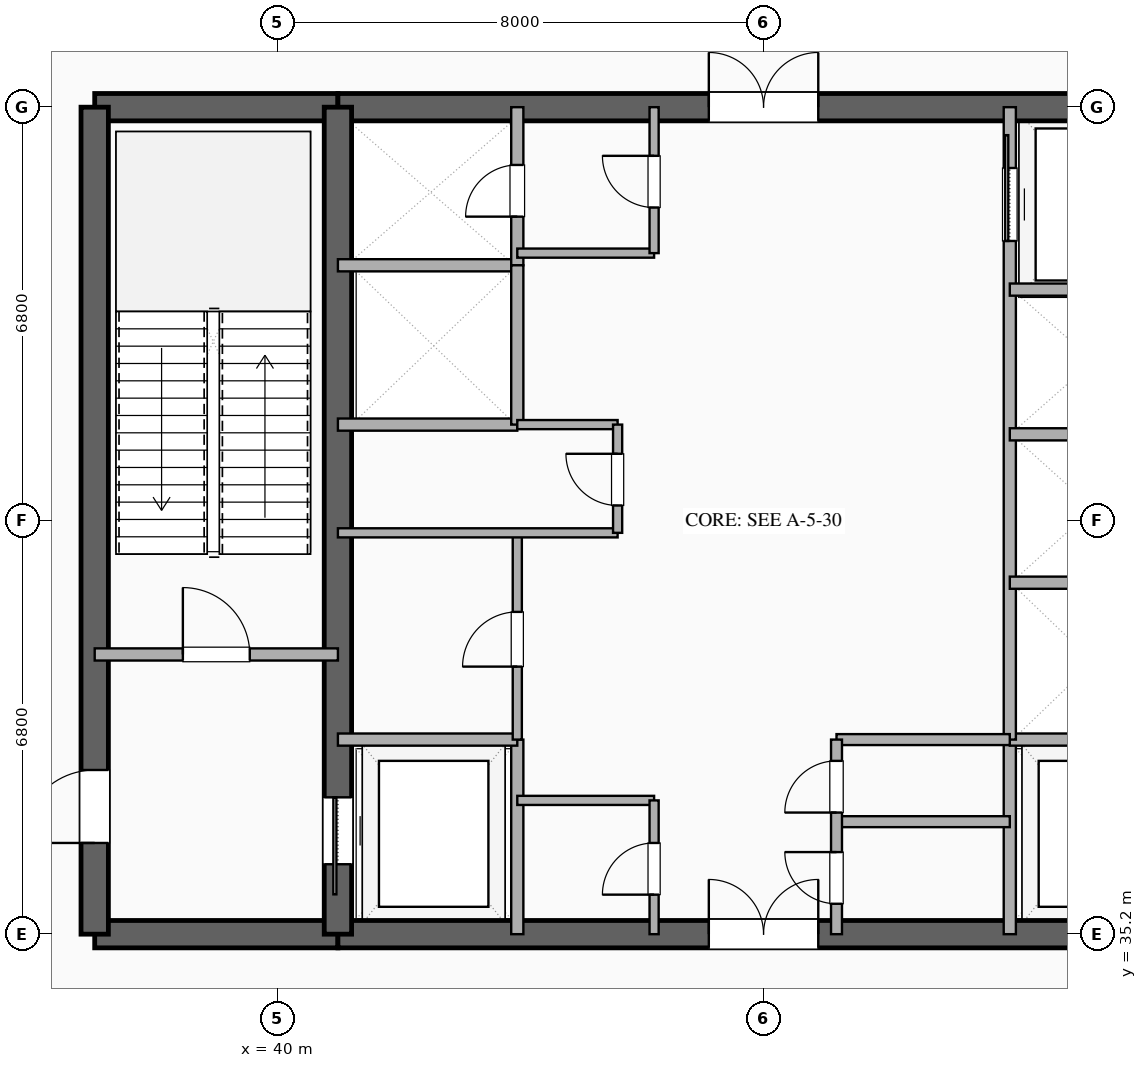
"""IFC4 building model, lengths in metres.
Left out: names, types, materials, properties, quantities, classifications, styles, units other than length and angle.
Written with IfcOpenShell. Run it as: python <this file> out.ifc"""

import sys

from ifc_helpers import new_model, si_unit, direction, frame, frame_2d, origin, place, context, subcontext, project, spatial, rectangle, extrude, element, fill, save


model = new_model("IFC4")
c1 = context("Model", 3, precision=1e-05, world=origin(), true_north=direction((0.0, 1.0)))
c2 = subcontext(c1, "Body", "Model", "MODEL_VIEW")
j1 = project(units=[si_unit("LENGTHUNIT", "METRE"), si_unit("PLANEANGLEUNIT", "RADIAN")], contexts=[c1])
p1 = place(None, origin())
s1 = spatial("IfcSite", under=j1, at=p1, CompositionType="ELEMENT")
p2 = place(p1, origin())
s2 = spatial("IfcBuilding", under=s1, at=p2, CompositionType="ELEMENT")
p3 = place(p2, frame((0.0, 0.0, 201.0)))
s3 = spatial("IfcBuildingStorey", under=s2, at=p3, CompositionType="ELEMENT", Elevation=201.0)
p4 = place(p3, frame((37.0, 35.2, 0.0), z_axis=(0.0, 0.0, 1.0), x_axis=(1.0, 0.0, 0.0)))
e1 = element("IfcWall", 1, at=p4, inside=s3, PredefinedType="SHEAR", context=c2, shape_type="SweptSolid", body=[
    extrude(rectangle(XDim=4.0, YDim=0.45, at=frame_2d((2.0, 0.0))), origin(), (0.0, 0.0, 1.0), 5.15),
])
p5 = place(p3, frame((41.0, 35.2, 0.0), z_axis=(0.0, 0.0, 1.0), x_axis=(1.0, 0.0, 0.0)))
e2 = element("IfcWall", 2, at=p5, inside=s3, PredefinedType="SHEAR", context=c2, shape_type="SweptSolid", body=[
    extrude(rectangle(XDim=14.0, YDim=0.45, at=frame_2d((7.0, 0.0))), origin(), (0.0, 0.0, 1.0), 5.15),
])
p6 = place(p5, frame((6.1, 0.0, 0.0)))
e3 = element("IfcOpeningElement", 3, at=p6, cuts=e2, PredefinedType="OPENING", context=c2, shape_type="SweptSolid", body=[
    extrude(rectangle(XDim=1.8, YDim=2.25, at=frame_2d((0.9, 1.125))), frame((0.0, 0.235, 0.0), z_axis=(0.0, -1.0, 0.0), x_axis=(1.0, 0.0, 0.0)), (0.0, 0.0, 1.0), 0.47),
])
p7 = place(p3, frame((37.0, 48.8, 0.0), z_axis=(0.0, 0.0, 1.0), x_axis=(1.0, 0.0, 0.0)))
e4 = element("IfcWall", 4, at=p7, inside=s3, PredefinedType="SHEAR", context=c2, shape_type="SweptSolid", body=[
    extrude(rectangle(XDim=4.0, YDim=0.45, at=frame_2d((2.0, 0.0))), origin(), (0.0, 0.0, 1.0), 5.15),
])
p8 = place(p3, frame((41.0, 48.8, 0.0), z_axis=(0.0, 0.0, 1.0), x_axis=(1.0, 0.0, 0.0)))
e5 = element("IfcWall", 5, at=p8, inside=s3, PredefinedType="SHEAR", context=c2, shape_type="SweptSolid", body=[
    extrude(rectangle(XDim=14.0, YDim=0.45, at=frame_2d((7.0, 0.0))), origin(), (0.0, 0.0, 1.0), 5.15),
])
p9 = place(p8, frame((6.1, 0.0, 0.0)))
e6 = element("IfcOpeningElement", 6, at=p9, cuts=e5, PredefinedType="OPENING", context=c2, shape_type="SweptSolid", body=[
    extrude(rectangle(XDim=1.8, YDim=2.25, at=frame_2d((0.9, 1.125))), frame((0.0, 0.235, 0.0), z_axis=(0.0, -1.0, 0.0), x_axis=(1.0, 0.0, 0.0)), (0.0, 0.0, 1.0), 0.47),
])
p10 = place(p3, frame((37.0, 35.2, 0.0), z_axis=(0.0, 0.0, 1.0), x_axis=(0.0, 1.0, 0.0)))
e7 = element("IfcWall", 7, at=p10, inside=s3, PredefinedType="SHEAR", context=c2, shape_type="SweptSolid", body=[
    extrude(rectangle(XDim=13.6, YDim=0.45, at=frame_2d((6.8, 0.0))), origin(), (0.0, 0.0, 1.0), 5.15),
])
p11 = place(p10, frame((1.5, 0.0, 0.0)))
e8 = element("IfcOpeningElement", 8, at=p11, cuts=e7, PredefinedType="OPENING", context=c2, shape_type="SweptSolid", body=[
    extrude(rectangle(XDim=1.2, YDim=2.15, at=frame_2d((0.6, 1.075))), frame((0.0, 0.235, 0.0), z_axis=(0.0, -1.0, 0.0), x_axis=(1.0, 0.0, 0.0)), (0.0, 0.0, 1.0), 0.47),
])
p12 = place(p3, frame((41.0, 35.2, 0.0), z_axis=(0.0, 0.0, 1.0), x_axis=(0.0, 1.0, 0.0)))
e9 = element("IfcWall", 9, at=p12, inside=s3, PredefinedType="SHEAR", context=c2, shape_type="SweptSolid", body=[
    extrude(rectangle(XDim=13.6, YDim=0.45, at=frame_2d((6.8, 0.0))), origin(), (0.0, 0.0, 1.0), 5.15),
])
p13 = place(p12, frame((1.15, 0.0, 0.0)))
e10 = element("IfcOpeningElement", 10, at=p13, cuts=e9, PredefinedType="OPENING", context=c2, shape_type="SweptSolid", body=[
    extrude(rectangle(XDim=1.1, YDim=2.2, at=frame_2d((0.55, 1.1))), frame((0.0, 0.235, 0.0), z_axis=(0.0, -1.0, 0.0), x_axis=(1.0, 0.0, 0.0)), (0.0, 0.0, 1.0), 0.47),
])
p14 = place(p3, frame((37.0, 39.8, 0.0), z_axis=(0.0, 0.0, 1.0), x_axis=(1.0, 0.0, 0.0)))
e11 = element("IfcWall", 11, at=p14, inside=s3, PredefinedType="SOLIDWALL", context=c2, shape_type="SweptSolid", body=[
    extrude(rectangle(XDim=4.0, YDim=0.2, at=frame_2d((2.0, 0.0))), origin(), (0.0, 0.0, 1.0), 3.45),
])
p15 = place(p14, frame((1.45, 0.0, 0.0)))
e12 = element("IfcOpeningElement", 12, at=p15, cuts=e11, PredefinedType="OPENING", context=c2, shape_type="SweptSolid", body=[
    extrude(rectangle(XDim=1.1, YDim=2.15, at=frame_2d((0.55, 1.075))), frame((0.0, 0.11, 0.0), z_axis=(0.0, -1.0, 0.0), x_axis=(1.0, 0.0, 0.0)), (0.0, 0.0, 1.0), 0.22),
])
p16 = place(p3, frame((43.95, 35.2, 0.0), z_axis=(0.0, 0.0, 1.0), x_axis=(0.0, 1.0, 0.0)))
e13 = element("IfcWall", 13, at=p16, inside=s3, PredefinedType="SOLIDWALL", context=c2, shape_type="SweptSolid", body=[
    extrude(rectangle(XDim=3.2, YDim=0.2, at=frame_2d((1.6, 0.0))), origin(), (0.0, 0.0, 1.0), 3.45),
])
p17 = place(p3, frame((41.0, 38.4, 0.0), z_axis=(0.0, 0.0, 1.0), x_axis=(1.0, 0.0, 0.0)))
e14 = element("IfcWall", 14, at=p17, inside=s3, PredefinedType="SOLIDWALL", context=c2, shape_type="SweptSolid", body=[
    extrude(rectangle(XDim=2.95, YDim=0.2, at=frame_2d((1.475, 0.0))), origin(), (0.0, 0.0, 1.0), 3.45),
])
p18 = place(p3, frame((52.05, 35.2, 0.0), z_axis=(0.0, 0.0, 1.0), x_axis=(0.0, 1.0, 0.0)))
e15 = element("IfcWall", 15, at=p18, inside=s3, PredefinedType="SOLIDWALL", context=c2, shape_type="SweptSolid", body=[
    extrude(rectangle(XDim=3.2, YDim=0.2, at=frame_2d((1.6, 0.0))), origin(), (0.0, 0.0, 1.0), 3.45),
])
for number, where, z_axis, x_axis in (
    (16, (52.05, 38.4, 0.0), (0.0, 0.0, 1.0), (1.0, 0.0, 0.0)),
    (17, (41.0, 46.2, 0.0), (0.0, 0.0, 1.0), (1.0, 0.0, 0.0)),
):
    element("IfcWall", number, at=place(p3, frame(where, z_axis=z_axis, x_axis=x_axis)), inside=s3, PredefinedType="SOLIDWALL", context=c2, shape_type="SweptSolid", body=[
        extrude(rectangle(XDim=2.95, YDim=0.2, at=frame_2d((1.475, 0.0))), origin(), (0.0, 0.0, 1.0), 3.45),
    ])
p19 = place(p3, frame((43.95, 46.2, 0.0), z_axis=(0.0, 0.0, 1.0), x_axis=(0.0, 1.0, 0.0)))
e18 = element("IfcWall", 18, at=p19, inside=s3, PredefinedType="SOLIDWALL", context=c2, shape_type="SweptSolid", body=[
    extrude(rectangle(XDim=2.6, YDim=0.2, at=frame_2d((1.3, 0.0))), origin(), (0.0, 0.0, 1.0), 3.45),
])
p20 = place(p19, frame((0.8, 0.0, 0.0)))
e19 = element("IfcOpeningElement", 19, at=p20, cuts=e18, PredefinedType="OPENING", context=c2, shape_type="SweptSolid", body=[
    extrude(rectangle(XDim=0.85, YDim=2.15, at=frame_2d((0.425, 1.075))), frame((0.0, 0.11, 0.0), z_axis=(0.0, -1.0, 0.0), x_axis=(1.0, 0.0, 0.0)), (0.0, 0.0, 1.0), 0.22),
])
p21 = place(p3, frame((41.0, 43.58, 0.0), z_axis=(0.0, 0.0, 1.0), x_axis=(1.0, 0.0, 0.0)))
e20 = element("IfcWall", 20, at=p21, inside=s3, PredefinedType="SOLIDWALL", context=c2, shape_type="SweptSolid", body=[
    extrude(rectangle(XDim=2.95, YDim=0.2, at=frame_2d((1.475, 0.0))), origin(), (0.0, 0.0, 1.0), 3.45),
])
p22 = place(p3, frame((43.95, 43.58, 0.0), z_axis=(0.0, 0.0, 1.0), x_axis=(0.0, 1.0, 0.0)))
e21 = element("IfcWall", 21, at=p22, inside=s3, PredefinedType="SOLIDWALL", context=c2, shape_type="SweptSolid", body=[
    extrude(rectangle(XDim=2.62, YDim=0.2, at=frame_2d((1.31, 0.0))), origin(), (0.0, 0.0, 1.0), 3.45),
])
p23 = place(p3, frame((43.95, 38.4, 0.0), z_axis=(0.0, 0.0, 1.0), x_axis=(0.0, 1.0, 0.0)))
e22 = element("IfcWall", 22, at=p23, inside=s3, PredefinedType="PARTITIONING", context=c2, shape_type="SweptSolid", body=[
    extrude(rectangle(XDim=3.4, YDim=0.15, at=frame_2d((1.7, 0.0))), origin(), (0.0, 0.0, 1.0), 3.45),
])
p24 = place(p23, frame((1.2, 0.0, 0.0)))
e23 = element("IfcOpeningElement", 23, at=p24, cuts=e22, PredefinedType="OPENING", context=c2, shape_type="SweptSolid", body=[
    extrude(rectangle(XDim=0.9, YDim=2.15, at=frame_2d((0.45, 1.075))), frame((0.0, 0.085, 0.0), z_axis=(0.0, -1.0, 0.0), x_axis=(1.0, 0.0, 0.0)), (0.0, 0.0, 1.0), 0.17),
])
p25 = place(p3, frame((41.0, 41.8, 0.0), z_axis=(0.0, 0.0, 1.0), x_axis=(1.0, 0.0, 0.0)))
e24 = element("IfcWall", 24, at=p25, inside=s3, PredefinedType="PARTITIONING", context=c2, shape_type="SweptSolid", body=[
    extrude(rectangle(XDim=4.6, YDim=0.15, at=frame_2d((2.3, 0.0))), origin(), (0.0, 0.0, 1.0), 3.45),
])
p26 = place(p3, frame((43.95, 43.58, 0.0), z_axis=(0.0, 0.0, 1.0), x_axis=(1.0, 0.0, 0.0)))
e25 = element("IfcWall", 25, at=p26, inside=s3, PredefinedType="PARTITIONING", context=c2, shape_type="SweptSolid", body=[
    extrude(rectangle(XDim=1.65, YDim=0.15, at=frame_2d((0.825, 0.0))), origin(), (0.0, 0.0, 1.0), 3.45),
])
p27 = place(p3, frame((45.6, 41.8, 0.0), z_axis=(0.0, 0.0, 1.0), x_axis=(0.0, 1.0, 0.0)))
e26 = element("IfcWall", 26, at=p27, inside=s3, PredefinedType="PARTITIONING", context=c2, shape_type="SweptSolid", body=[
    extrude(rectangle(XDim=1.78, YDim=0.15, at=frame_2d((0.89, 0.0))), origin(), (0.0, 0.0, 1.0), 3.45),
])
p28 = place(p27, frame((0.45, 0.0, 0.0)))
e27 = element("IfcOpeningElement", 27, at=p28, cuts=e26, PredefinedType="OPENING", context=c2, shape_type="SweptSolid", body=[
    extrude(rectangle(XDim=0.85, YDim=2.15, at=frame_2d((0.425, 1.075))), frame((0.0, 0.085, 0.0), z_axis=(0.0, -1.0, 0.0), x_axis=(1.0, 0.0, 0.0)), (0.0, 0.0, 1.0), 0.17),
])
p29 = place(p3, frame((52.05, 38.4, 0.0), z_axis=(0.0, 0.0, 1.0), x_axis=(0.0, 1.0, 0.0)))
e28 = element("IfcWall", 28, at=p29, inside=s3, PredefinedType="SOLIDWALL", context=c2, shape_type="SweptSolid", body=[
    extrude(rectangle(XDim=10.4, YDim=0.2, at=frame_2d((5.2, 0.0))), origin(), (0.0, 0.0, 1.0), 3.45),
])
p30 = place(p29, frame((8.2, 0.0, 0.0)))
e29 = element("IfcOpeningElement", 29, at=p30, cuts=e28, PredefinedType="OPENING", context=c2, shape_type="SweptSolid", body=[
    extrude(rectangle(XDim=1.2, YDim=2.2, at=frame_2d((0.6, 1.1))), frame((0.0, 0.11, 0.0), z_axis=(0.0, -1.0, 0.0), x_axis=(1.0, 0.0, 0.0)), (0.0, 0.0, 1.0), 0.22),
])
for number, where, z_axis, x_axis in (
    (30, (52.05, 40.98, 0.0), (0.0, 0.0, 1.0), (1.0, 0.0, 0.0)),
    (31, (52.05, 43.42, 0.0), (0.0, 0.0, 1.0), (1.0, 0.0, 0.0)),
    (32, (52.05, 45.8, 0.0), (0.0, 0.0, 1.0), (1.0, 0.0, 0.0)),
):
    element("IfcWall", number, at=place(p3, frame(where, z_axis=z_axis, x_axis=x_axis)), inside=s3, PredefinedType="SOLIDWALL", context=c2, shape_type="SweptSolid", body=[
        extrude(rectangle(XDim=2.95, YDim=0.2, at=frame_2d((1.475, 0.0))), origin(), (0.0, 0.0, 1.0), 3.45),
    ])
p31 = place(p3, frame((43.95, 37.4, 0.0), z_axis=(0.0, 0.0, 1.0), x_axis=(1.0, 0.0, 0.0)))
e33 = element("IfcWall", 33, at=p31, inside=s3, PredefinedType="PARTITIONING", context=c2, shape_type="SweptSolid", body=[
    extrude(rectangle(XDim=2.25, YDim=0.15, at=frame_2d((1.125, 0.0))), origin(), (0.0, 0.0, 1.0), 3.45),
])
p32 = place(p3, frame((46.2, 35.2, 0.0), z_axis=(0.0, 0.0, 1.0), x_axis=(0.0, 1.0, 0.0)))
e34 = element("IfcWall", 34, at=p32, inside=s3, PredefinedType="PARTITIONING", context=c2, shape_type="SweptSolid", body=[
    extrude(rectangle(XDim=2.2, YDim=0.15, at=frame_2d((1.1, 0.0))), origin(), (0.0, 0.0, 1.0), 3.45),
])
p33 = place(p32, frame((0.65, 0.0, 0.0)))
e35 = element("IfcOpeningElement", 35, at=p33, cuts=e34, PredefinedType="OPENING", context=c2, shape_type="SweptSolid", body=[
    extrude(rectangle(XDim=0.85, YDim=2.15, at=frame_2d((0.425, 1.075))), frame((0.0, 0.085, 0.0), z_axis=(0.0, -1.0, 0.0), x_axis=(1.0, 0.0, 0.0)), (0.0, 0.0, 1.0), 0.17),
])
p34 = place(p3, frame((43.95, 46.4, 0.0), z_axis=(0.0, 0.0, 1.0), x_axis=(1.0, 0.0, 0.0)))
e36 = element("IfcWall", 36, at=p34, inside=s3, PredefinedType="PARTITIONING", context=c2, shape_type="SweptSolid", body=[
    extrude(rectangle(XDim=2.25, YDim=0.15, at=frame_2d((1.125, 0.0))), origin(), (0.0, 0.0, 1.0), 3.45),
])
p35 = place(p3, frame((46.2, 46.4, 0.0), z_axis=(0.0, 0.0, 1.0), x_axis=(0.0, 1.0, 0.0)))
e37 = element("IfcWall", 37, at=p35, inside=s3, PredefinedType="PARTITIONING", context=c2, shape_type="SweptSolid", body=[
    extrude(rectangle(XDim=2.4, YDim=0.15, at=frame_2d((1.2, 0.0))), origin(), (0.0, 0.0, 1.0), 3.45),
])
p36 = place(p35, frame((0.75, 0.0, 0.0)))
e38 = element("IfcOpeningElement", 38, at=p36, cuts=e37, PredefinedType="OPENING", context=c2, shape_type="SweptSolid", body=[
    extrude(rectangle(XDim=0.85, YDim=2.15, at=frame_2d((0.425, 1.075))), frame((0.0, 0.085, 0.0), z_axis=(0.0, -1.0, 0.0), x_axis=(1.0, 0.0, 0.0)), (0.0, 0.0, 1.0), 0.17),
])
for number, where, z_axis, x_axis in (
    (39, (49.2, 37.05, 0.0), (0.0, 0.0, 1.0), (1.0, 0.0, 0.0)),
    (40, (49.2, 38.4, 0.0), (0.0, 0.0, 1.0), (1.0, 0.0, 0.0)),
):
    element("IfcWall", number, at=place(p3, frame(where, z_axis=z_axis, x_axis=x_axis)), inside=s3, PredefinedType="PLUMBINGWALL", context=c2, shape_type="SweptSolid", body=[
        extrude(rectangle(XDim=2.85, YDim=0.18, at=frame_2d((1.425, 0.0))), origin(), (0.0, 0.0, 1.0), 3.45),
    ])
p37 = place(p3, frame((49.2, 35.2, 0.0), z_axis=(0.0, 0.0, 1.0), x_axis=(0.0, 1.0, 0.0)))
e41 = element("IfcWall", 41, at=p37, inside=s3, PredefinedType="PLUMBINGWALL", context=c2, shape_type="SweptSolid", body=[
    extrude(rectangle(XDim=3.2, YDim=0.18, at=frame_2d((1.6, 0.0))), origin(), (0.0, 0.0, 1.0), 3.45),
])
p38 = place(p37, frame((0.5, 0.0, 0.0)))
e42 = element("IfcOpeningElement", 42, at=p38, cuts=e41, PredefinedType="OPENING", context=c2, shape_type="SweptSolid", body=[
    extrude(rectangle(XDim=0.85, YDim=2.1, at=frame_2d((0.425, 1.05))), frame((0.0, 0.1, 0.0), z_axis=(0.0, -1.0, 0.0), x_axis=(1.0, 0.0, 0.0)), (0.0, 0.0, 1.0), 0.2),
])
p39 = place(p37, frame((2.0, 0.0, 0.0)))
e43 = element("IfcOpeningElement", 43, at=p39, cuts=e41, PredefinedType="OPENING", context=c2, shape_type="SweptSolid", body=[
    extrude(rectangle(XDim=0.85, YDim=2.15, at=frame_2d((0.425, 1.075))), frame((0.0, 0.1, 0.0), z_axis=(0.0, -1.0, 0.0), x_axis=(1.0, 0.0, 0.0)), (0.0, 0.0, 1.0), 0.2),
])
p40 = place(p13, origin())
e44 = element("IfcDoor", 44, at=p40, inside=s3, OperationType="SLIDING_TO_LEFT", PredefinedType="DOOR", context=c2, shape_type="SweptSolid", body=[
    extrude(rectangle(XDim=1.1, YDim=2.2, at=frame_2d((0.55, 1.1))), frame((0.0, 0.025, 0.0), z_axis=(0.0, -1.0, 0.0), x_axis=(1.0, 0.0, 0.0)), (0.0, 0.0, 1.0), 0.05),
])
fill(e10, e44)
p41 = place(p11, origin())
e45 = element("IfcDoor", 45, at=p41, inside=s3, OperationType="SINGLE_SWING_LEFT", PredefinedType="DOOR", context=c2, shape_type="SweptSolid", body=[
    extrude(rectangle(XDim=1.2, YDim=2.15, at=frame_2d((0.6, 1.075))), frame((0.0, 0.025, 0.0), z_axis=(0.0, -1.0, 0.0), x_axis=(1.0, 0.0, 0.0)), (0.0, 0.0, 1.0), 0.05),
])
fill(e8, e45)
p42 = place(p6, origin())
e46 = element("IfcDoor", 46, at=p42, inside=s3, OperationType="DOUBLE_DOOR_SINGLE_SWING", PredefinedType="DOOR", context=c2, shape_type="SweptSolid", body=[
    extrude(rectangle(XDim=1.8, YDim=2.25, at=frame_2d((0.9, 1.125))), frame((0.0, 0.025, 0.0), z_axis=(0.0, -1.0, 0.0), x_axis=(1.0, 0.0, 0.0)), (0.0, 0.0, 1.0), 0.05),
])
fill(e3, e46)
p43 = place(p9, origin())
e47 = element("IfcDoor", 47, at=p43, inside=s3, OperationType="DOUBLE_DOOR_SINGLE_SWING", PredefinedType="DOOR", context=c2, shape_type="SweptSolid", body=[
    extrude(rectangle(XDim=1.8, YDim=2.25, at=frame_2d((0.9, 1.125))), frame((0.0, 0.025, 0.0), z_axis=(0.0, -1.0, 0.0), x_axis=(1.0, 0.0, 0.0)), (0.0, 0.0, 1.0), 0.05),
])
fill(e6, e47)
p44 = place(p15, origin())
e48 = element("IfcDoor", 48, at=p44, inside=s3, OperationType="SINGLE_SWING_LEFT", PredefinedType="DOOR", context=c2, shape_type="SweptSolid", body=[
    extrude(rectangle(XDim=1.1, YDim=2.15, at=frame_2d((0.55, 1.075))), frame((0.0, 0.025, 0.0), z_axis=(0.0, -1.0, 0.0), x_axis=(1.0, 0.0, 0.0)), (0.0, 0.0, 1.0), 0.05),
])
fill(e12, e48)
p45 = place(p20, origin())
e49 = element("IfcDoor", 49, at=p45, inside=s3, OperationType="SINGLE_SWING_LEFT", PredefinedType="DOOR", context=c2, shape_type="SweptSolid", body=[
    extrude(rectangle(XDim=0.85, YDim=2.15, at=frame_2d((0.425, 1.075))), frame((0.0, 0.025, 0.0), z_axis=(0.0, -1.0, 0.0), x_axis=(1.0, 0.0, 0.0)), (0.0, 0.0, 1.0), 0.05),
])
fill(e19, e49)
p46 = place(p24, origin())
e50 = element("IfcDoor", 50, at=p46, inside=s3, OperationType="SINGLE_SWING_LEFT", PredefinedType="DOOR", context=c2, shape_type="SweptSolid", body=[
    extrude(rectangle(XDim=0.9, YDim=2.15, at=frame_2d((0.45, 1.075))), frame((0.0, 0.025, 0.0), z_axis=(0.0, -1.0, 0.0), x_axis=(1.0, 0.0, 0.0)), (0.0, 0.0, 1.0), 0.05),
])
fill(e23, e50)
p47 = place(p28, origin())
e51 = element("IfcDoor", 51, at=p47, inside=s3, OperationType="SINGLE_SWING_RIGHT", PredefinedType="DOOR", context=c2, shape_type="SweptSolid", body=[
    extrude(rectangle(XDim=0.85, YDim=2.15, at=frame_2d((0.425, 1.075))), frame((0.0, 0.025, 0.0), z_axis=(0.0, -1.0, 0.0), x_axis=(1.0, 0.0, 0.0)), (0.0, 0.0, 1.0), 0.05),
])
fill(e27, e51)
p48 = place(p30, origin())
e52 = element("IfcDoor", 52, at=p48, inside=s3, OperationType="SLIDING_TO_RIGHT", PredefinedType="DOOR", context=c2, shape_type="SweptSolid", body=[
    extrude(rectangle(XDim=1.2, YDim=2.2, at=frame_2d((0.6, 1.1))), frame((0.0, 0.025, 0.0), z_axis=(0.0, -1.0, 0.0), x_axis=(1.0, 0.0, 0.0)), (0.0, 0.0, 1.0), 0.05),
])
fill(e29, e52)
p49 = place(p33, origin())
e53 = element("IfcDoor", 53, at=p49, inside=s3, OperationType="SINGLE_SWING_LEFT", PredefinedType="DOOR", context=c2, shape_type="SweptSolid", body=[
    extrude(rectangle(XDim=0.85, YDim=2.15, at=frame_2d((0.425, 1.075))), frame((0.0, 0.025, 0.0), z_axis=(0.0, -1.0, 0.0), x_axis=(1.0, 0.0, 0.0)), (0.0, 0.0, 1.0), 0.05),
])
fill(e35, e53)
p50 = place(p36, origin())
e54 = element("IfcDoor", 54, at=p50, inside=s3, OperationType="SINGLE_SWING_RIGHT", PredefinedType="DOOR", context=c2, shape_type="SweptSolid", body=[
    extrude(rectangle(XDim=0.85, YDim=2.15, at=frame_2d((0.425, 1.075))), frame((0.0, 0.025, 0.0), z_axis=(0.0, -1.0, 0.0), x_axis=(1.0, 0.0, 0.0)), (0.0, 0.0, 1.0), 0.05),
])
fill(e38, e54)
p51 = place(p38, origin())
e55 = element("IfcDoor", 55, at=p51, inside=s3, OperationType="SINGLE_SWING_RIGHT", PredefinedType="DOOR", context=c2, shape_type="SweptSolid", body=[
    extrude(rectangle(XDim=0.85, YDim=2.1, at=frame_2d((0.425, 1.05))), frame((0.0, 0.025, 0.0), z_axis=(0.0, -1.0, 0.0), x_axis=(1.0, 0.0, 0.0)), (0.0, 0.0, 1.0), 0.05),
])
fill(e42, e55)
p52 = place(p39, origin())
e56 = element("IfcDoor", 56, at=p52, inside=s3, OperationType="SINGLE_SWING_LEFT", PredefinedType="DOOR", context=c2, shape_type="SweptSolid", body=[
    extrude(rectangle(XDim=0.85, YDim=2.15, at=frame_2d((0.425, 1.075))), frame((0.0, 0.025, 0.0), z_axis=(0.0, -1.0, 0.0), x_axis=(1.0, 0.0, 0.0)), (0.0, 0.0, 1.0), 0.05),
])
fill(e43, e56)
save(model, sys.argv[1])
